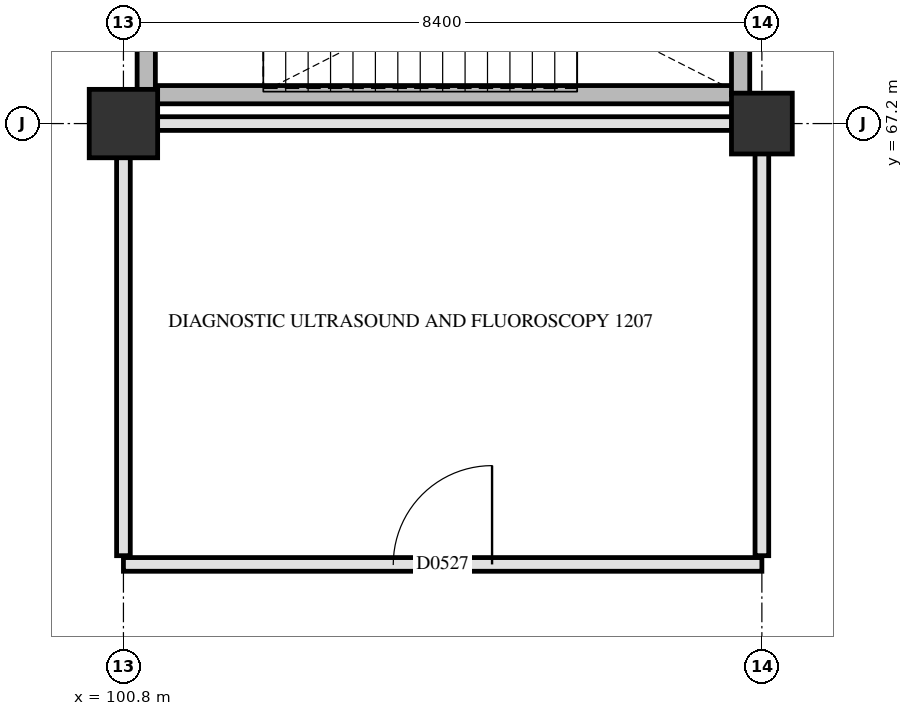
"""IFC4 building model, lengths in metres.
Left out: names, types, materials, properties, quantities, classifications, styles, units other than length and angle.
Written with IfcOpenShell. Run it as: python <this file> out.ifc"""

import sys

from ifc_helpers import new_model, si_unit, direction, frame, frame_2d, origin, origin_2d, place, context, subcontext, project, spatial, rectangle, circle, extrude, element, fill, save


model = new_model("IFC4")
c1 = context("Model", 3, precision=1e-05, world=origin(), true_north=direction((0.0, 1.0)))
c2 = subcontext(c1, "Body", "Model", "MODEL_VIEW")
j1 = project(units=[si_unit("LENGTHUNIT", "METRE"), si_unit("PLANEANGLEUNIT", "RADIAN")], contexts=[c1])
p1 = place(None, origin())
s1 = spatial("IfcSite", under=j1, at=p1, CompositionType="ELEMENT")
p2 = place(p1, origin())
s2 = spatial("IfcBuilding", under=s1, at=p2, CompositionType="ELEMENT")
p3 = place(p2, origin())
s3 = spatial("IfcBuildingStorey", under=s2, at=p3, CompositionType="ELEMENT", Elevation=0.0)
p4 = place(p3, frame((100.8, 67.2, 0.0), z_axis=(0.0, 0.0, 1.0), x_axis=(1.0, 0.0, 0.0)))
e1 = element("IfcColumn", 1, at=p4, inside=s3, PredefinedType="COLUMN", context=c2, shape_type="SweptSolid", body=[
    extrude(rectangle(XDim=0.9, YDim=0.9, at=origin_2d()), origin(), (0.0, 0.0, 1.0), 4.8),
])
p5 = place(p3, frame((109.2, 67.2, 0.0), z_axis=(0.0, 0.0, 1.0), x_axis=(1.0, 0.0, 0.0)))
e2 = element("IfcColumn", 2, at=p5, inside=s3, PredefinedType="COLUMN", context=c2, shape_type="SweptSolid", body=[
    extrude(circle(Radius=0.4, at=origin_2d()), origin(), (0.0, 0.0, 1.0), 4.8),
])
p6 = place(p3, frame((101.1, 67.58, 0.0), z_axis=(0.0, 0.0, 1.0), x_axis=(1.0, 0.0, 0.0)))
e3 = element("IfcWall", 3, at=p6, inside=s3, PredefinedType="SHEAR", context=c2, shape_type="SweptSolid", body=[
    extrude(rectangle(XDim=7.82, YDim=0.24, at=frame_2d((3.91, 0.0))), origin(), (0.0, 0.0, 1.0), 4.5),
])
for number, where, z_axis, x_axis in (
    (4, (101.1, 67.58, 0.0), (0.0, 0.0, 1.0), (0.0, 1.0, 0.0)),
    (5, (108.92, 67.58, 0.0), (0.0, 0.0, 1.0), (0.0, 1.0, 0.0)),
):
    element("IfcWall", number, at=place(p3, frame(where, z_axis=z_axis, x_axis=x_axis)), inside=s3, PredefinedType="SHEAR", context=c2, shape_type="SweptSolid", body=[
        extrude(rectangle(XDim=3.32, YDim=0.24, at=frame_2d((1.66, 0.0))), origin(), (0.0, 0.0, 1.0), 4.5),
    ])
p7 = place(p3, frame((100.8, 61.4, 0.0), z_axis=(0.0, 0.0, 1.0), x_axis=(1.0, 0.0, 0.0)))
e6 = element("IfcWall", 6, at=p7, inside=s3, PredefinedType="PARTITIONING", context=c2, shape_type="SweptSolid", body=[
    extrude(rectangle(XDim=8.4, YDim=0.18, at=frame_2d((4.2, 0.0))), origin(), (0.0, 0.0, 1.0), 3.89),
])
p8 = place(p7, frame((3.55, 0.0, 0.0)))
e7 = element("IfcOpeningElement", 7, at=p8, cuts=e6, PredefinedType="OPENING", context=c2, shape_type="SweptSolid", body=[
    extrude(rectangle(XDim=1.3, YDim=2.2, at=frame_2d((0.65, 1.1))), frame((0.0, 0.1, 0.0), z_axis=(0.0, -1.0, 0.0), x_axis=(1.0, 0.0, 0.0)), (0.0, 0.0, 1.0), 0.2),
])
p9 = place(p3, frame((101.245, 67.2, 0.0), z_axis=(0.0, 0.0, 1.0), x_axis=(1.0, 0.0, 0.0)))
e8 = element("IfcWall", 8, at=p9, inside=s3, PredefinedType="PARTITIONING", context=c2, shape_type="SweptSolid", body=[
    extrude(rectangle(XDim=7.56, YDim=0.18, at=frame_2d((3.78, 0.0))), origin(), (0.0, 0.0, 1.0), 3.84),
])
p10 = place(p3, frame((100.8, 61.515, 0.0), z_axis=(0.0, 0.0, 1.0), x_axis=(0.0, 1.0, 0.0)))
e9 = element("IfcWall", 9, at=p10, inside=s3, PredefinedType="PARTITIONING", context=c2, shape_type="SweptSolid", body=[
    extrude(rectangle(XDim=5.24, YDim=0.18, at=frame_2d((2.62, 0.0))), origin(), (0.0, 0.0, 1.0), 3.89),
])
p11 = place(p3, frame((109.2, 61.515, 0.0), z_axis=(0.0, 0.0, 1.0), x_axis=(0.0, 1.0, 0.0)))
e10 = element("IfcWall", 10, at=p11, inside=s3, PredefinedType="PARTITIONING", context=c2, shape_type="SweptSolid", body=[
    extrude(rectangle(XDim=5.29, YDim=0.18, at=frame_2d((2.645, 0.0))), origin(), (0.0, 0.0, 1.0), 3.89),
])
p12 = place(p8, origin())
e11 = element("IfcDoor", 11, at=p12, inside=s3, OperationType="SINGLE_SWING_RIGHT", PredefinedType="DOOR", context=c2, shape_type="SweptSolid", body=[
    extrude(rectangle(XDim=1.3, YDim=2.2, at=frame_2d((0.65, 1.1))), frame((0.0, 0.025, 0.0), z_axis=(0.0, -1.0, 0.0), x_axis=(1.0, 0.0, 0.0)), (0.0, 0.0, 1.0), 0.05),
])
fill(e7, e11)
save(model, sys.argv[1])
